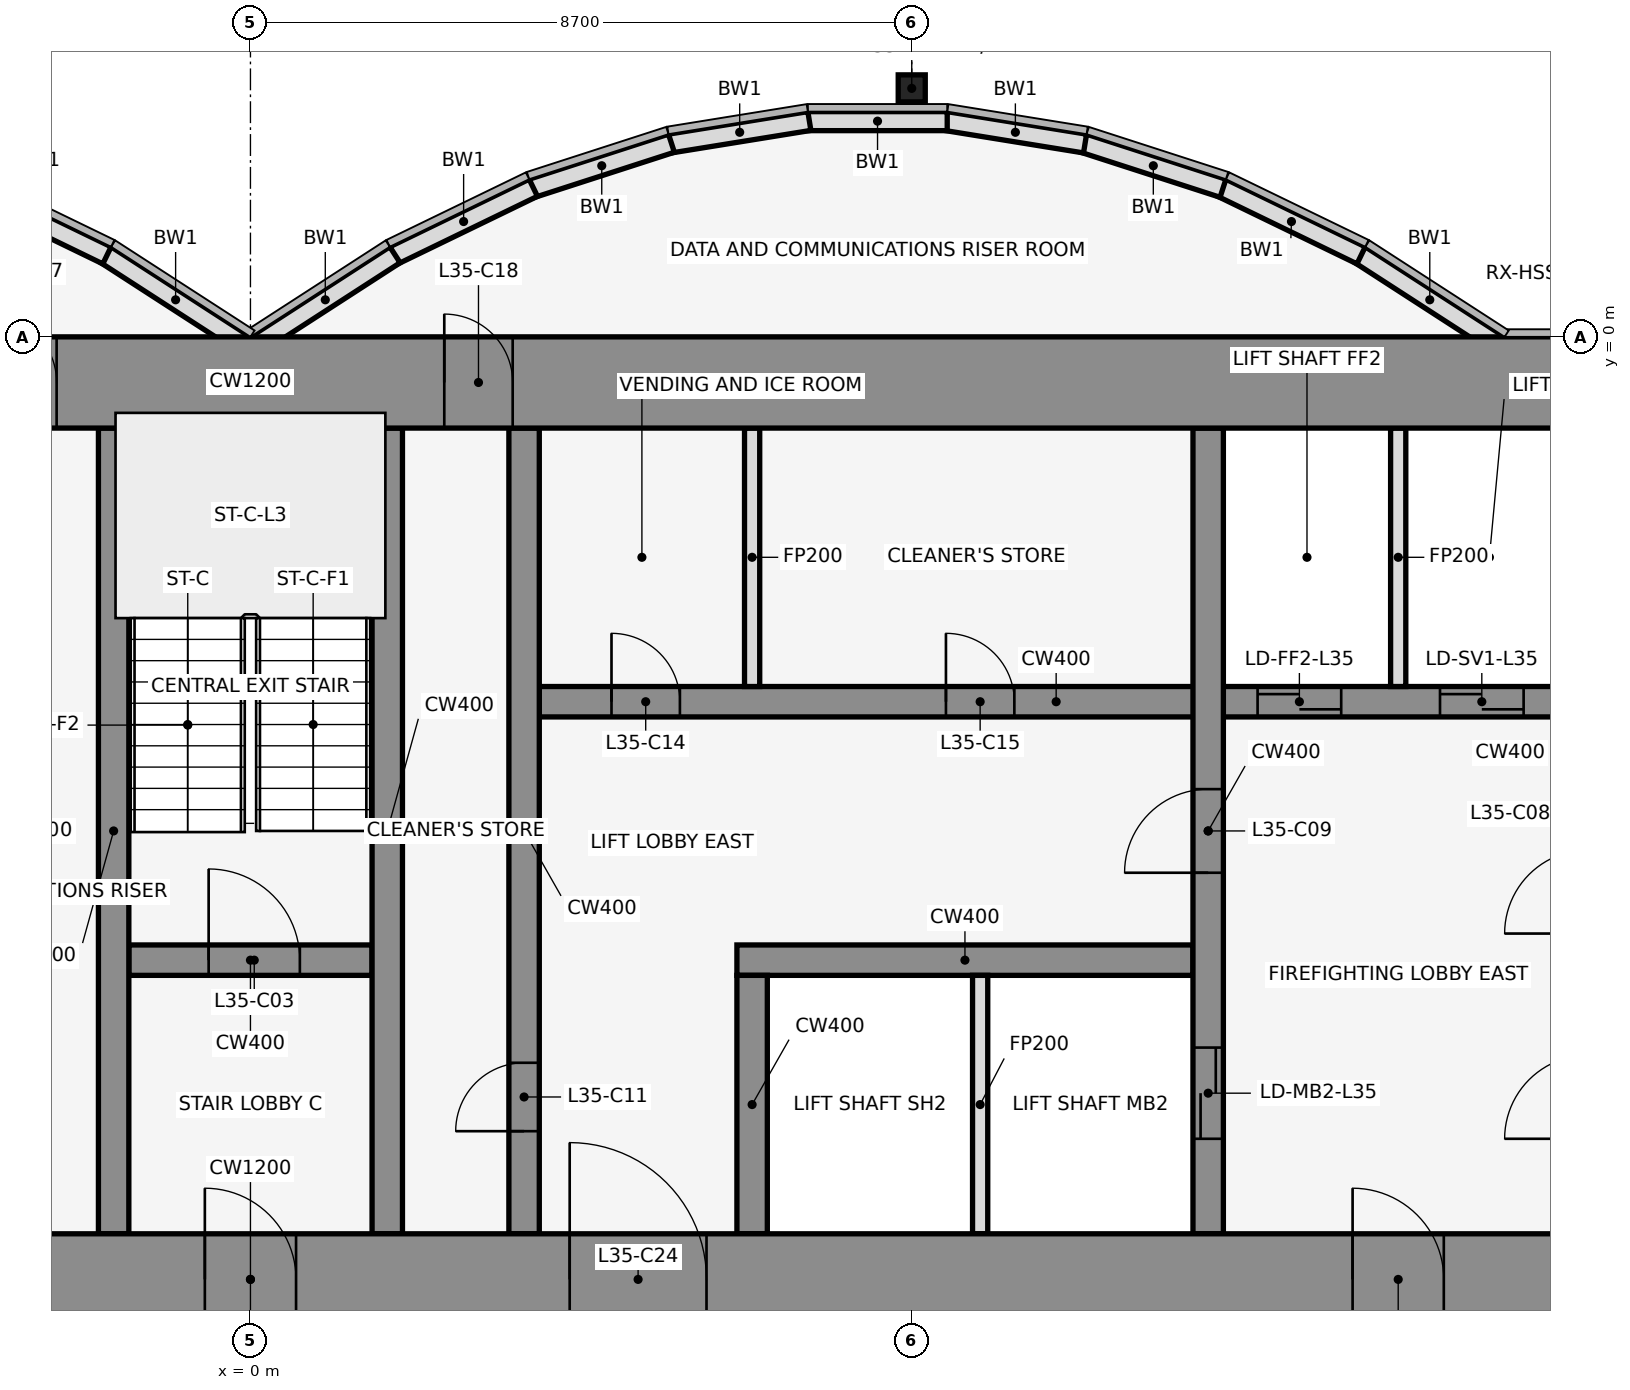
"""IFC4 building model, lengths in metres.
Left out: names, types, materials, properties, quantities, classifications, styles, units other than length and angle.
Written with IfcOpenShell. Run it as: python <this file> out.ifc"""

import sys

from ifc_helpers import new_model, si_unit, direction, frame, frame_2d, origin, origin_2d, place, context, subcontext, project, spatial, rectangle, hollow_rectangle, extrude, element, fill, save


model = new_model("IFC4")
c1 = context("Model", 3, precision=1e-05, world=origin(), true_north=direction((0.0, 1.0)))
c2 = subcontext(c1, "Body", "Model", "MODEL_VIEW")
j1 = project(units=[si_unit("LENGTHUNIT", "METRE"), si_unit("PLANEANGLEUNIT", "RADIAN")], contexts=[c1])
p1 = place(None, origin())
s1 = spatial("IfcSite", under=j1, at=p1, CompositionType="ELEMENT")
p2 = place(p1, origin())
s2 = spatial("IfcBuilding", under=s1, at=p2, CompositionType="ELEMENT")
p3 = place(p2, frame((0.0, 0.0, 160.9)))
s3 = spatial("IfcBuildingStorey", under=s2, at=p3, CompositionType="ELEMENT", Elevation=160.9)
p4 = place(p3, frame((8.7, 3.269, 0.0), z_axis=(0.0, 0.0, 1.0), x_axis=(1.0, 0.0, 0.0)))
e1 = element("IfcColumn", 1, at=p4, inside=s3, PredefinedType="COLUMN", context=c2, shape_type="SweptSolid", body=[
    extrude(hollow_rectangle(XDim=0.356, YDim=0.356, WallThickness=0.012, at=origin_2d()), origin(), (0.0, 0.0, 1.0), 4.1),
])
p5 = place(p3, frame((16.432, -0.105, 0.0), z_axis=(0.0, 0.0, 1.0), x_axis=(-0.83981312244, 0.542875602121, 0.0)))
e2 = element("IfcWall", 2, at=p5, inside=s3, PredefinedType="STANDARD", context=c2, shape_type="SweptSolid", body=[
    extrude(rectangle(XDim=2.183, YDim=0.25, at=frame_2d((1.091, 0.0))), origin(), (0.0, 0.0, 1.0), 3.95),
])
p6 = place(p3, frame((14.612, 1.073, 0.0), z_axis=(0.0, 0.0, 1.0), x_axis=(-0.89982408427, 0.436252928206, 0.0)))
e3 = element("IfcWall", 3, at=p6, inside=s3, PredefinedType="STANDARD", context=c2, shape_type="SweptSolid", body=[
    extrude(rectangle(XDim=2.038, YDim=0.25, at=frame_2d((1.019, 0.0))), origin(), (0.0, 0.0, 1.0), 3.95),
])
p7 = place(p3, frame((12.795, 1.955, 0.0), z_axis=(0.0, 0.0, 1.0), x_axis=(-0.951495806175, 0.307661714928, 0.0)))
e4 = element("IfcWall", 4, at=p7, inside=s3, PredefinedType="STANDARD", context=c2, shape_type="SweptSolid", body=[
    extrude(rectangle(XDim=1.927, YDim=0.25, at=frame_2d((0.963, 0.0))), origin(), (0.0, 0.0, 1.0), 3.95),
])
p8 = place(p3, frame((10.98, 2.543, 0.0), z_axis=(0.0, 0.0, 1.0), x_axis=(-0.987181718931, 0.159600293885, 0.0)))
e5 = element("IfcWall", 5, at=p8, inside=s3, PredefinedType="STANDARD", context=c2, shape_type="SweptSolid", body=[
    extrude(rectangle(XDim=1.857, YDim=0.25, at=frame_2d((0.929, 0.0))), origin(), (0.0, 0.0, 1.0), 3.95),
])
p9 = place(p3, frame((9.167, 2.838, 0.0), z_axis=(0.0, 0.0, 1.0), x_axis=(-1.0, 0.0, 0.0)))
e6 = element("IfcWall", 6, at=p9, inside=s3, PredefinedType="STANDARD", context=c2, shape_type="SweptSolid", body=[
    extrude(rectangle(XDim=1.833, YDim=0.25, at=frame_2d((0.917, 0.0))), origin(), (0.0, 0.0, 1.0), 3.95),
])
p10 = place(p3, frame((7.353, 2.84, 0.0), z_axis=(0.0, 0.0, 1.0), x_axis=(-0.987181718931, -0.159600293885, 0.0)))
e7 = element("IfcWall", 7, at=p10, inside=s3, PredefinedType="STANDARD", context=c2, shape_type="SweptSolid", body=[
    extrude(rectangle(XDim=1.857, YDim=0.25, at=frame_2d((0.929, 0.0))), origin(), (0.0, 0.0, 1.0), 3.95),
])
p11 = place(p3, frame((5.538, 2.548, 0.0), z_axis=(0.0, 0.0, 1.0), x_axis=(-0.951495806175, -0.307661714928, 0.0)))
e8 = element("IfcWall", 8, at=p11, inside=s3, PredefinedType="STANDARD", context=c2, shape_type="SweptSolid", body=[
    extrude(rectangle(XDim=1.927, YDim=0.25, at=frame_2d((0.963, 0.0))), origin(), (0.0, 0.0, 1.0), 3.95),
])
p12 = place(p3, frame((3.721, 1.962, 0.0), z_axis=(0.0, 0.0, 1.0), x_axis=(-0.89982408427, -0.436252928206, 0.0)))
e9 = element("IfcWall", 9, at=p12, inside=s3, PredefinedType="STANDARD", context=c2, shape_type="SweptSolid", body=[
    extrude(rectangle(XDim=2.038, YDim=0.25, at=frame_2d((1.019, 0.0))), origin(), (0.0, 0.0, 1.0), 3.95),
])
for number, where, z_axis, x_axis in (
    (10, (1.901, 1.08, 0.0), (0.0, 0.0, 1.0), (-0.84, -0.543, 0.0)),
    (11, (-0.068, -0.105, 0.0), (0.0, 0.0, 1.0), (-0.84, 0.543, 0.0)),
):
    element("IfcWall", number, at=place(p3, frame(where, z_axis=z_axis, x_axis=x_axis)), inside=s3, PredefinedType="STANDARD", context=c2, shape_type="SweptSolid", body=[
        extrude(rectangle(XDim=2.183, YDim=0.25, at=frame_2d((1.091, 0.0))), origin(), (0.0, 0.0, 1.0), 3.95),
    ])
p13 = place(p3, frame((-1.888, 1.073, 0.0), z_axis=(0.0, 0.0, 1.0), x_axis=(-0.89982408427, 0.436252928206, 0.0)))
e12 = element("IfcWall", 12, at=p13, inside=s3, PredefinedType="STANDARD", context=c2, shape_type="SweptSolid", body=[
    extrude(rectangle(XDim=2.038, YDim=0.25, at=frame_2d((1.019, 0.0))), origin(), (0.0, 0.0, 1.0), 3.95),
])
p14 = place(p3, frame((-1.6, -8.2, 0.0), z_axis=(0.0, 0.0, 1.0), x_axis=(1.0, 0.0, 0.0)))
e13 = element("IfcWall", 13, at=p14, inside=s3, PredefinedType="SHEAR", context=c2, shape_type="SweptSolid", body=[
    extrude(rectangle(XDim=3.2, YDim=0.4, at=frame_2d((1.6, 0.0))), origin(), (0.0, 0.0, 1.0), 4.1),
])
p15 = place(p14, frame((1.05, 0.0, 0.0)))
e14 = element("IfcOpeningElement", 14, at=p15, cuts=e13, PredefinedType="OPENING", context=c2, shape_type="SweptSolid", body=[
    extrude(rectangle(XDim=1.2, YDim=2.1, at=frame_2d((0.6, 1.05))), frame((0.0, 0.212, 0.0), z_axis=(0.0, -1.0, 0.0), x_axis=(1.0, 0.0, 0.0)), (0.0, 0.0, 1.0), 0.424),
])
p16 = place(p3, frame((6.4, -8.2, 0.0), z_axis=(0.0, 0.0, 1.0), x_axis=(1.0, 0.0, 0.0)))
e15 = element("IfcWall", 15, at=p16, inside=s3, PredefinedType="SHEAR", context=c2, shape_type="SweptSolid", body=[
    extrude(rectangle(XDim=6.0, YDim=0.4, at=frame_2d((3.0, 0.0))), origin(), (0.0, 0.0, 1.0), 4.1),
])
p17 = place(p3, frame((3.8, -4.8, 0.0), z_axis=(0.0, 0.0, 1.0), x_axis=(1.0, 0.0, 0.0)))
e16 = element("IfcWall", 16, at=p17, inside=s3, PredefinedType="SHEAR", context=c2, shape_type="SweptSolid", body=[
    extrude(rectangle(XDim=13.6, YDim=0.4, at=frame_2d((6.8, 0.0))), origin(), (0.0, 0.0, 1.0), 4.1),
])
p18 = place(p17, frame((9.45, 0.0, 0.0)))
e17 = element("IfcOpeningElement", 17, at=p18, cuts=e16, PredefinedType="OPENING", context=c2, shape_type="SweptSolid", body=[
    extrude(rectangle(XDim=1.1, YDim=2.1, at=frame_2d((0.55, 1.05))), frame((0.0, 0.212, 0.0), z_axis=(0.0, -1.0, 0.0), x_axis=(1.0, 0.0, 0.0)), (0.0, 0.0, 1.0), 0.424),
])
p19 = place(p17, frame((11.85, 0.0, 0.0)))
e18 = element("IfcOpeningElement", 18, at=p19, cuts=e16, PredefinedType="OPENING", context=c2, shape_type="SweptSolid", body=[
    extrude(rectangle(XDim=1.1, YDim=2.1, at=frame_2d((0.55, 1.05))), frame((0.0, 0.212, 0.0), z_axis=(0.0, -1.0, 0.0), x_axis=(1.0, 0.0, 0.0)), (0.0, 0.0, 1.0), 0.424),
])
p20 = place(p17, frame((0.95, 0.0, 0.0)))
e19 = element("IfcOpeningElement", 19, at=p20, cuts=e16, PredefinedType="OPENING", context=c2, shape_type="SweptSolid", body=[
    extrude(rectangle(XDim=0.9, YDim=2.1, at=frame_2d((0.45, 1.05))), frame((0.0, 0.212, 0.0), z_axis=(0.0, -1.0, 0.0), x_axis=(1.0, 0.0, 0.0)), (0.0, 0.0, 1.0), 0.424),
])
p21 = place(p17, frame((5.35, 0.0, 0.0)))
e20 = element("IfcOpeningElement", 20, at=p21, cuts=e16, PredefinedType="OPENING", context=c2, shape_type="SweptSolid", body=[
    extrude(rectangle(XDim=0.9, YDim=2.1, at=frame_2d((0.45, 1.05))), frame((0.0, 0.212, 0.0), z_axis=(0.0, -1.0, 0.0), x_axis=(1.0, 0.0, 0.0)), (0.0, 0.0, 1.0), 0.424),
])
for number, where, z_axis, x_axis in (
    (21, (-1.8, -11.8, 0.0), (0.0, 0.0, 1.0), (0.0, 1.0, 0.0)),
    (22, (1.8, -11.8, 0.0), (0.0, 0.0, 1.0), (0.0, 1.0, 0.0)),
):
    element("IfcWall", number, at=place(p3, frame(where, z_axis=z_axis, x_axis=x_axis)), inside=s3, PredefinedType="SHEAR", context=c2, shape_type="SweptSolid", body=[
        extrude(rectangle(XDim=10.6, YDim=0.4, at=frame_2d((5.3, 0.0))), origin(), (0.0, 0.0, 1.0), 4.1),
    ])
p22 = place(p3, frame((3.6, -11.8, 0.0), z_axis=(0.0, 0.0, 1.0), x_axis=(0.0, 1.0, 0.0)))
e23 = element("IfcWall", 23, at=p22, inside=s3, PredefinedType="SHEAR", context=c2, shape_type="SweptSolid", body=[
    extrude(rectangle(XDim=10.6, YDim=0.4, at=frame_2d((5.3, 0.0))), origin(), (0.0, 0.0, 1.0), 4.1),
])
p23 = place(p22, frame((1.35, 0.0, 0.0)))
e24 = element("IfcOpeningElement", 24, at=p23, cuts=e23, PredefinedType="OPENING", context=c2, shape_type="SweptSolid", body=[
    extrude(rectangle(XDim=0.9, YDim=2.1, at=frame_2d((0.45, 1.05))), frame((0.0, 0.212, 0.0), z_axis=(0.0, -1.0, 0.0), x_axis=(1.0, 0.0, 0.0)), (0.0, 0.0, 1.0), 0.424),
])
p24 = place(p3, frame((6.6, -11.8, 0.0), z_axis=(0.0, 0.0, 1.0), x_axis=(0.0, 1.0, 0.0)))
e25 = element("IfcWall", 25, at=p24, inside=s3, PredefinedType="SHEAR", context=c2, shape_type="SweptSolid", body=[
    extrude(rectangle(XDim=3.4, YDim=0.4, at=frame_2d((1.7, 0.0))), origin(), (0.0, 0.0, 1.0), 4.1),
])
for number, where, z_axis, x_axis in (
    (26, (6.6, -4.6, 0.0), (0.0, 0.0, 1.0), (0.0, 1.0, 0.0)),
    (27, (9.6, -11.8, 0.0), (0.0, 0.0, 1.0), (0.0, 1.0, 0.0)),
):
    element("IfcWall", number, at=place(p3, frame(where, z_axis=z_axis, x_axis=x_axis)), inside=s3, PredefinedType="PARTITIONING", context=c2, shape_type="SweptSolid", body=[
        extrude(rectangle(XDim=3.4, YDim=0.2, at=frame_2d((1.7, 0.0))), origin(), (0.0, 0.0, 1.0), 2.841),
    ])
p25 = place(p3, frame((12.6, -11.8, 0.0), z_axis=(0.0, 0.0, 1.0), x_axis=(0.0, 1.0, 0.0)))
e28 = element("IfcWall", 28, at=p25, inside=s3, PredefinedType="SHEAR", context=c2, shape_type="SweptSolid", body=[
    extrude(rectangle(XDim=10.6, YDim=0.4, at=frame_2d((5.3, 0.0))), origin(), (0.0, 0.0, 1.0), 4.1),
])
p26 = place(p25, frame((1.25, 0.0, 0.0)))
e29 = element("IfcOpeningElement", 29, at=p26, cuts=e28, PredefinedType="OPENING", context=c2, shape_type="SweptSolid", body=[
    extrude(rectangle(XDim=1.2, YDim=2.1, at=frame_2d((0.6, 1.05))), frame((0.0, 0.212, 0.0), z_axis=(0.0, -1.0, 0.0), x_axis=(1.0, 0.0, 0.0)), (0.0, 0.0, 1.0), 0.424),
])
p27 = place(p25, frame((4.75, 0.0, 0.0)))
e30 = element("IfcOpeningElement", 30, at=p27, cuts=e28, PredefinedType="OPENING", context=c2, shape_type="SweptSolid", body=[
    extrude(rectangle(XDim=1.1, YDim=2.1, at=frame_2d((0.55, 1.05))), frame((0.0, 0.212, 0.0), z_axis=(0.0, -1.0, 0.0), x_axis=(1.0, 0.0, 0.0)), (0.0, 0.0, 1.0), 0.424),
])
p28 = place(p3, frame((15.1, -4.6, 0.0), z_axis=(0.0, 0.0, 1.0), x_axis=(0.0, 1.0, 0.0)))
e31 = element("IfcWall", 31, at=p28, inside=s3, PredefinedType="PARTITIONING", context=c2, shape_type="SweptSolid", body=[
    extrude(rectangle(XDim=3.4, YDim=0.2, at=frame_2d((1.7, 0.0))), origin(), (0.0, 0.0, 1.0), 2.841),
])
p29 = place(p3, frame((-22.0, -0.6, 0.0), z_axis=(0.0, 0.0, 1.0), x_axis=(1.0, 0.0, 0.0)))
e32 = element("IfcWall", 32, at=p29, inside=s3, PredefinedType="SHEAR", context=c2, shape_type="SweptSolid", body=[
    extrude(rectangle(XDim=44.0, YDim=1.2, at=frame_2d((22.0, 0.0))), origin(), (0.0, 0.0, 1.0), 4.1),
])
p30 = place(p29, frame((18.55, 0.0, 0.0)))
e33 = element("IfcOpeningElement", 33, at=p30, cuts=e32, PredefinedType="OPENING", context=c2, shape_type="SweptSolid", body=[
    extrude(rectangle(XDim=0.9, YDim=2.1, at=frame_2d((0.45, 1.05))), frame((0.0, 0.612, 0.0), z_axis=(0.0, -1.0, 0.0), x_axis=(1.0, 0.0, 0.0)), (0.0, 0.0, 1.0), 1.224),
])
p31 = place(p29, frame((24.55, 0.0, 0.0)))
e34 = element("IfcOpeningElement", 34, at=p31, cuts=e32, PredefinedType="OPENING", context=c2, shape_type="SweptSolid", body=[
    extrude(rectangle(XDim=0.9, YDim=2.1, at=frame_2d((0.45, 1.05))), frame((0.0, 0.612, 0.0), z_axis=(0.0, -1.0, 0.0), x_axis=(1.0, 0.0, 0.0)), (0.0, 0.0, 1.0), 1.224),
])
p32 = place(p3, frame((-22.0, -12.4, 0.0), z_axis=(0.0, 0.0, 1.0), x_axis=(1.0, 0.0, 0.0)))
e35 = element("IfcWall", 35, at=p32, inside=s3, PredefinedType="SHEAR", context=c2, shape_type="SweptSolid", body=[
    extrude(rectangle(XDim=44.0, YDim=1.2, at=frame_2d((22.0, 0.0))), origin(), (0.0, 0.0, 1.0), 4.1),
])
p33 = place(p32, frame((2.2, 0.0, 0.0)))
e36 = element("IfcOpeningElement", 36, at=p33, cuts=e35, PredefinedType="OPENING", context=c2, shape_type="SweptSolid", body=[
    extrude(rectangle(XDim=1.2, YDim=2.1, at=frame_2d((0.6, 1.05))), frame((0.0, 0.612, 0.0), z_axis=(0.0, -1.0, 0.0), x_axis=(1.0, 0.0, 0.0)), (0.0, 0.0, 1.0), 1.224),
])
p34 = place(p32, frame((21.4, 0.0, 0.0)))
e37 = element("IfcOpeningElement", 37, at=p34, cuts=e35, PredefinedType="OPENING", context=c2, shape_type="SweptSolid", body=[
    extrude(rectangle(XDim=1.2, YDim=2.1, at=frame_2d((0.6, 1.05))), frame((0.0, 0.612, 0.0), z_axis=(0.0, -1.0, 0.0), x_axis=(1.0, 0.0, 0.0)), (0.0, 0.0, 1.0), 1.224),
])
p35 = place(p32, frame((40.6, 0.0, 0.0)))
e38 = element("IfcOpeningElement", 38, at=p35, cuts=e35, PredefinedType="OPENING", context=c2, shape_type="SweptSolid", body=[
    extrude(rectangle(XDim=1.2, YDim=2.1, at=frame_2d((0.6, 1.05))), frame((0.0, 0.612, 0.0), z_axis=(0.0, -1.0, 0.0), x_axis=(1.0, 0.0, 0.0)), (0.0, 0.0, 1.0), 1.224),
])
p36 = place(p32, frame((16.0, 0.0, 0.0)))
e39 = element("IfcOpeningElement", 39, at=p36, cuts=e35, PredefinedType="OPENING", context=c2, shape_type="SweptSolid", body=[
    extrude(rectangle(XDim=1.8, YDim=2.1, at=frame_2d((0.9, 1.05))), frame((0.0, 0.612, 0.0), z_axis=(0.0, -1.0, 0.0), x_axis=(1.0, 0.0, 0.0)), (0.0, 0.0, 1.0), 1.224),
])
p37 = place(p32, frame((6.3, 0.0, 0.0)))
e40 = element("IfcOpeningElement", 40, at=p37, cuts=e35, PredefinedType="OPENING", context=c2, shape_type="SweptSolid", body=[
    extrude(rectangle(XDim=1.2, YDim=2.1, at=frame_2d((0.6, 1.05))), frame((0.0, 0.612, 0.0), z_axis=(0.0, -1.0, 0.0), x_axis=(1.0, 0.0, 0.0)), (0.0, 0.0, 1.0), 1.224),
])
p38 = place(p32, frame((26.2, 0.0, 0.0)))
e41 = element("IfcOpeningElement", 41, at=p38, cuts=e35, PredefinedType="OPENING", context=c2, shape_type="SweptSolid", body=[
    extrude(rectangle(XDim=1.8, YDim=2.1, at=frame_2d((0.9, 1.05))), frame((0.0, 0.612, 0.0), z_axis=(0.0, -1.0, 0.0), x_axis=(1.0, 0.0, 0.0)), (0.0, 0.0, 1.0), 1.224),
])
p39 = place(p32, frame((36.5, 0.0, 0.0)))
e42 = element("IfcOpeningElement", 42, at=p39, cuts=e35, PredefinedType="OPENING", context=c2, shape_type="SweptSolid", body=[
    extrude(rectangle(XDim=1.2, YDim=2.1, at=frame_2d((0.6, 1.05))), frame((0.0, 0.612, 0.0), z_axis=(0.0, -1.0, 0.0), x_axis=(1.0, 0.0, 0.0)), (0.0, 0.0, 1.0), 1.224),
])
p40 = place(p15, origin())
e43 = element("IfcDoor", 43, at=p40, inside=s3, OperationType="SINGLE_SWING_LEFT", PredefinedType="DOOR", context=c2, shape_type="SweptSolid", body=[
    extrude(rectangle(XDim=1.2, YDim=2.1, at=frame_2d((0.6, 1.05))), frame((0.0, 0.025, 0.0), z_axis=(0.0, -1.0, 0.0), x_axis=(1.0, 0.0, 0.0)), (0.0, 0.0, 1.0), 0.05),
])
fill(e14, e43)
p41 = place(p26, origin())
e44 = element("IfcDoor", 44, at=p41, inside=s3, OperationType="DOUBLE_DOOR_SLIDING", PredefinedType="DOOR", context=c2, shape_type="SweptSolid", body=[
    extrude(rectangle(XDim=1.2, YDim=2.1, at=frame_2d((0.6, 1.05))), frame((0.0, 0.025, 0.0), z_axis=(0.0, -1.0, 0.0), x_axis=(1.0, 0.0, 0.0)), (0.0, 0.0, 1.0), 0.05),
])
fill(e29, e44)
p42 = place(p18, origin())
e45 = element("IfcDoor", 45, at=p42, inside=s3, OperationType="DOUBLE_DOOR_SLIDING", PredefinedType="DOOR", context=c2, shape_type="SweptSolid", body=[
    extrude(rectangle(XDim=1.1, YDim=2.1, at=frame_2d((0.55, 1.05))), frame((0.0, 0.025, 0.0), z_axis=(0.0, -1.0, 0.0), x_axis=(1.0, 0.0, 0.0)), (0.0, 0.0, 1.0), 0.05),
])
fill(e17, e45)
p43 = place(p19, origin())
e46 = element("IfcDoor", 46, at=p43, inside=s3, OperationType="DOUBLE_DOOR_SLIDING", PredefinedType="DOOR", context=c2, shape_type="SweptSolid", body=[
    extrude(rectangle(XDim=1.1, YDim=2.1, at=frame_2d((0.55, 1.05))), frame((0.0, 0.025, 0.0), z_axis=(0.0, -1.0, 0.0), x_axis=(1.0, 0.0, 0.0)), (0.0, 0.0, 1.0), 0.05),
])
fill(e18, e46)
p44 = place(p27, frame((1.1, 0.0, 0.0), z_axis=(0.0, 0.0, 1.0), x_axis=(-1.0, 0.0, 0.0)))
e47 = element("IfcDoor", 47, at=p44, inside=s3, OperationType="SINGLE_SWING_RIGHT", PredefinedType="DOOR", context=c2, shape_type="SweptSolid", body=[
    extrude(rectangle(XDim=1.1, YDim=2.1, at=frame_2d((0.55, 1.05))), frame((0.0, 0.025, 0.0), z_axis=(0.0, -1.0, 0.0), x_axis=(1.0, 0.0, 0.0)), (0.0, 0.0, 1.0), 0.05),
])
fill(e30, e47)
p45 = place(p23, origin())
e48 = element("IfcDoor", 48, at=p45, inside=s3, OperationType="SINGLE_SWING_LEFT", PredefinedType="DOOR", context=c2, shape_type="SweptSolid", body=[
    extrude(rectangle(XDim=0.9, YDim=2.1, at=frame_2d((0.45, 1.05))), frame((0.0, 0.025, 0.0), z_axis=(0.0, -1.0, 0.0), x_axis=(1.0, 0.0, 0.0)), (0.0, 0.0, 1.0), 0.05),
])
fill(e24, e48)
p46 = place(p20, origin())
e49 = element("IfcDoor", 49, at=p46, inside=s3, OperationType="SINGLE_SWING_RIGHT", PredefinedType="DOOR", context=c2, shape_type="SweptSolid", body=[
    extrude(rectangle(XDim=0.9, YDim=2.1, at=frame_2d((0.45, 1.05))), frame((0.0, 0.025, 0.0), z_axis=(0.0, -1.0, 0.0), x_axis=(1.0, 0.0, 0.0)), (0.0, 0.0, 1.0), 0.05),
])
fill(e19, e49)
p47 = place(p21, origin())
e50 = element("IfcDoor", 50, at=p47, inside=s3, OperationType="SINGLE_SWING_LEFT", PredefinedType="DOOR", context=c2, shape_type="SweptSolid", body=[
    extrude(rectangle(XDim=0.9, YDim=2.1, at=frame_2d((0.45, 1.05))), frame((0.0, 0.025, 0.0), z_axis=(0.0, -1.0, 0.0), x_axis=(1.0, 0.0, 0.0)), (0.0, 0.0, 1.0), 0.05),
])
fill(e20, e50)
p48 = place(p30, origin())
e51 = element("IfcDoor", 51, at=p48, inside=s3, OperationType="SINGLE_SWING_LEFT", PredefinedType="DOOR", context=c2, shape_type="SweptSolid", body=[
    extrude(rectangle(XDim=0.9, YDim=2.1, at=frame_2d((0.45, 1.05))), frame((0.0, 0.025, 0.0), z_axis=(0.0, -1.0, 0.0), x_axis=(1.0, 0.0, 0.0)), (0.0, 0.0, 1.0), 0.05),
])
fill(e33, e51)
p49 = place(p31, origin())
e52 = element("IfcDoor", 52, at=p49, inside=s3, OperationType="SINGLE_SWING_LEFT", PredefinedType="DOOR", context=c2, shape_type="SweptSolid", body=[
    extrude(rectangle(XDim=0.9, YDim=2.1, at=frame_2d((0.45, 1.05))), frame((0.0, 0.025, 0.0), z_axis=(0.0, -1.0, 0.0), x_axis=(1.0, 0.0, 0.0)), (0.0, 0.0, 1.0), 0.05),
])
fill(e34, e52)
p50 = place(p34, frame((1.2, 0.0, 0.0), z_axis=(0.0, 0.0, 1.0), x_axis=(-1.0, 0.0, 0.0)))
e53 = element("IfcDoor", 53, at=p50, inside=s3, OperationType="SINGLE_SWING_RIGHT", PredefinedType="DOOR", context=c2, shape_type="SweptSolid", body=[
    extrude(rectangle(XDim=1.2, YDim=2.1, at=frame_2d((0.6, 1.05))), frame((0.0, 0.025, 0.0), z_axis=(0.0, -1.0, 0.0), x_axis=(1.0, 0.0, 0.0)), (0.0, 0.0, 1.0), 0.05),
])
fill(e37, e53)
p51 = place(p38, origin())
e54 = element("IfcDoor", 54, at=p51, inside=s3, OperationType="SINGLE_SWING_LEFT", PredefinedType="DOOR", context=c2, shape_type="SweptSolid", body=[
    extrude(rectangle(XDim=1.8, YDim=2.1, at=frame_2d((0.9, 1.05))), frame((0.0, 0.025, 0.0), z_axis=(0.0, -1.0, 0.0), x_axis=(1.0, 0.0, 0.0)), (0.0, 0.0, 1.0), 0.05),
])
fill(e41, e54)
p52 = place(p39, frame((1.2, 0.0, 0.0), z_axis=(0.0, 0.0, 1.0), x_axis=(-1.0, 0.0, 0.0)))
e55 = element("IfcDoor", 55, at=p52, inside=s3, OperationType="SINGLE_SWING_RIGHT", PredefinedType="DOOR", context=c2, shape_type="SweptSolid", body=[
    extrude(rectangle(XDim=1.2, YDim=2.1, at=frame_2d((0.6, 1.05))), frame((0.0, 0.025, 0.0), z_axis=(0.0, -1.0, 0.0), x_axis=(1.0, 0.0, 0.0)), (0.0, 0.0, 1.0), 0.05),
])
fill(e42, e55)
save(model, sys.argv[1])
